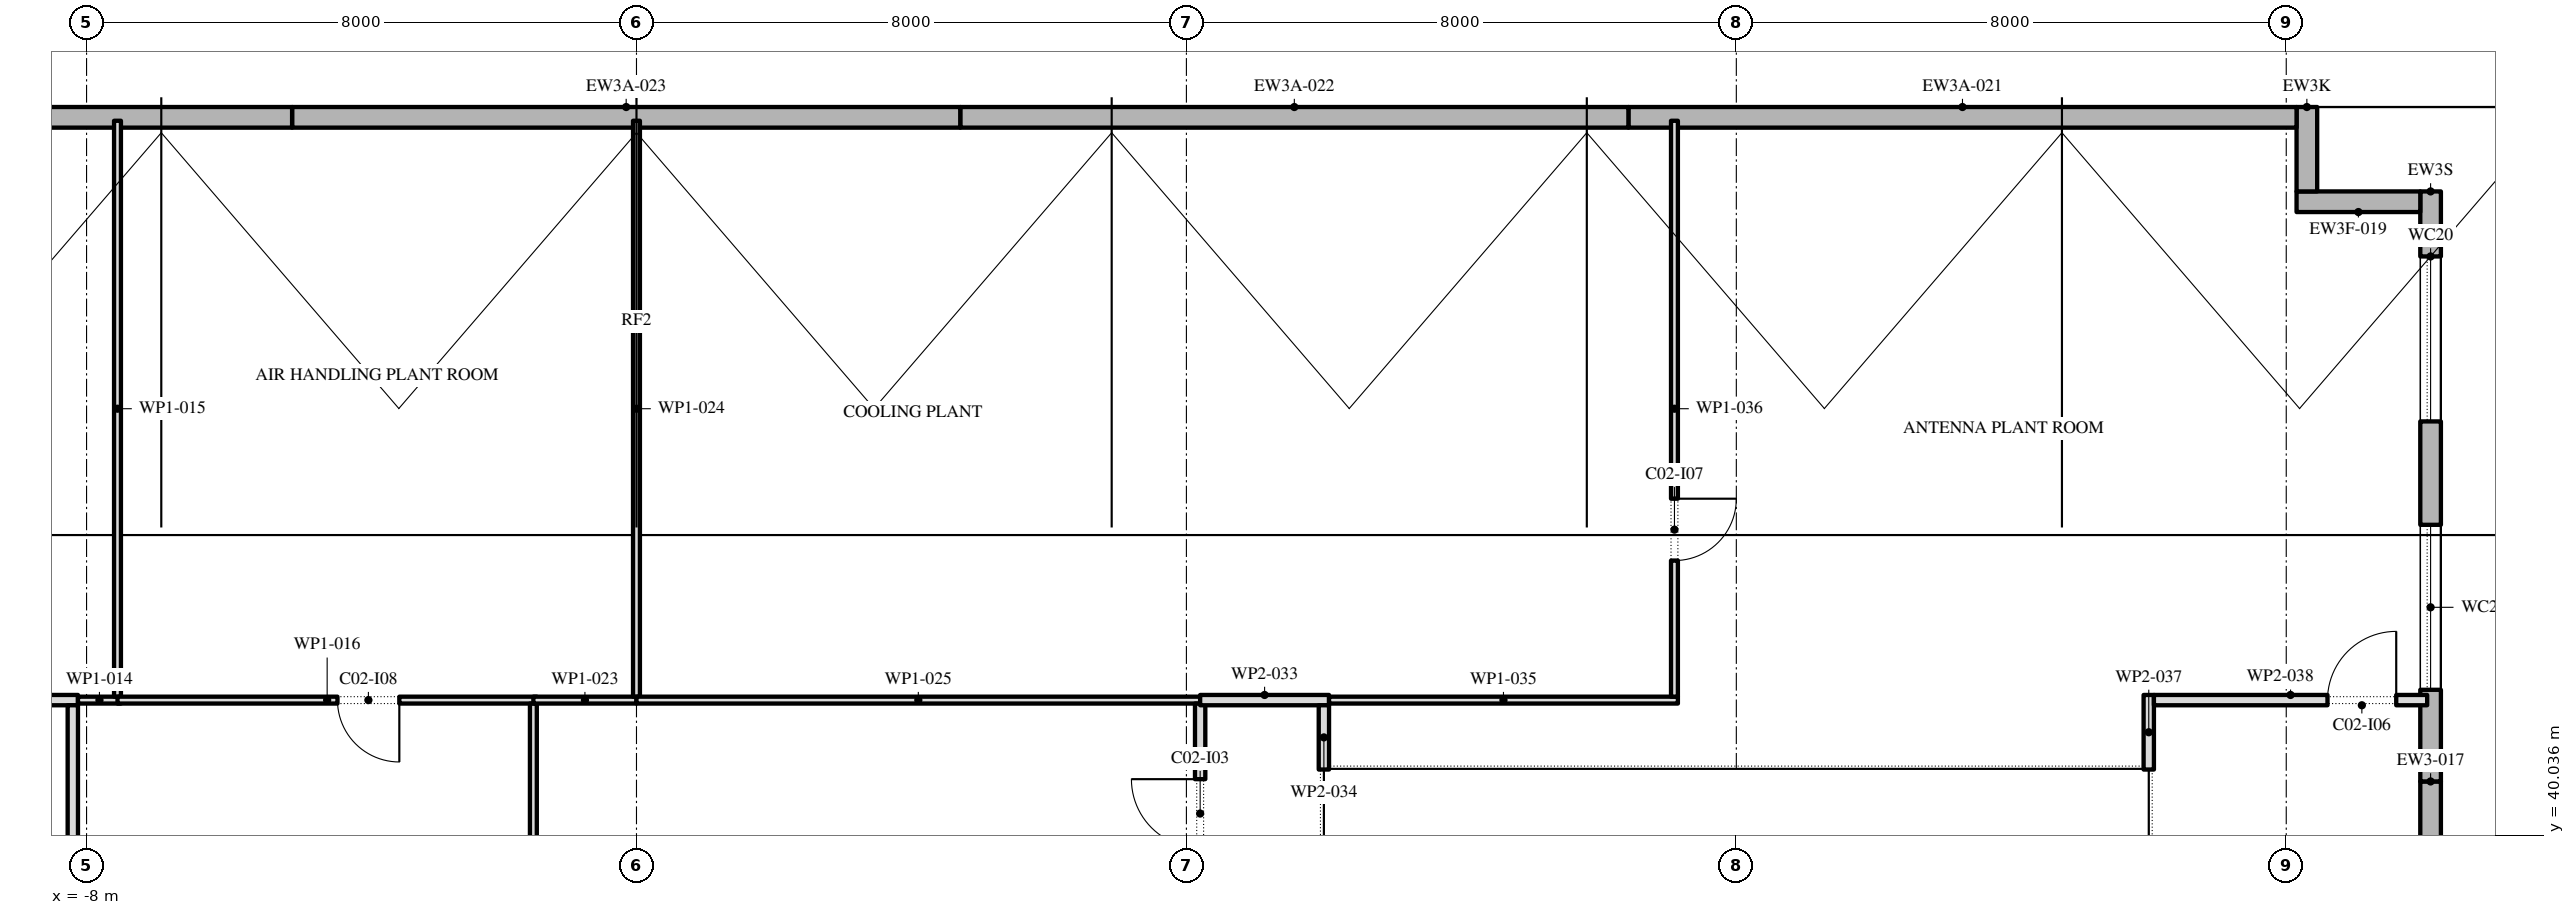
"""IFC4 building model, lengths in metres.
Left out: names, types, materials, properties, quantities, classifications, styles, units other than length and angle.
Written with IfcOpenShell. Run it as: python <this file> out.ifc"""

import sys

from ifc_helpers import new_model, si_unit, direction, frame, frame_2d, origin, place, context, subcontext, project, spatial, polyline, rectangle, outline, extrude, element, fill, save


model = new_model("IFC4")
c1 = context("Model", 3, precision=1e-05, world=origin(), true_north=direction((0.0, 1.0)))
c2 = subcontext(c1, "Body", "Model", "MODEL_VIEW")
j1 = project(units=[si_unit("LENGTHUNIT", "METRE"), si_unit("PLANEANGLEUNIT", "RADIAN")], contexts=[c1])
p1 = place(None, origin())
s1 = spatial("IfcSite", under=j1, at=p1, CompositionType="ELEMENT")
p2 = place(p1, origin())
s2 = spatial("IfcBuilding", under=s1, at=p2, CompositionType="ELEMENT")
p3 = place(p2, frame((0.0, 0.0, 369.0)))
s3 = spatial("IfcBuildingStorey", under=s2, at=p3, CompositionType="ELEMENT", Elevation=369.0)
p4 = place(p3, frame((24.15, 51.05, 0.0), z_axis=(0.0, 0.0, 1.0), x_axis=(-1.0, 0.0, 0.0)))
e1 = element("IfcWall", 1, at=p4, inside=s3, PredefinedType="STANDARD", context=c2, shape_type="SweptSolid", body=[
    extrude(rectangle(XDim=1.8, YDim=0.3, at=frame_2d((0.9, 0.0))), origin(), (0.0, 0.0, 1.0), 6.014),
])
p5 = place(p2, frame((0.0, 0.0, 373.2)))
s4 = spatial("IfcBuildingStorey", under=s2, at=p5, CompositionType="ELEMENT", Elevation=373.2)
p6 = place(p5, frame((26.1, 32.233, 0.0), z_axis=(0.0, 0.0, 1.0), x_axis=(0.0, 1.0, 0.0)))
e2 = element("IfcWall", 2, at=p6, inside=s4, PredefinedType="STANDARD", context=c2, shape_type="SweptSolid", body=[
    extrude(rectangle(XDim=8.583, YDim=0.3, at=frame_2d((4.292, 0.0))), origin(), (0.0, 0.0, 1.0), 4.0),
])
p7 = place(p6, frame((0.946, 0.0, 0.8)))
e3 = element("IfcOpeningElement", 3, at=p7, cuts=e2, PredefinedType="OPENING", context=c2, shape_type="SweptSolid", body=[
    extrude(outline(polyline([(0.0, 0.0), (2.4, 0.0), (2.4, 1.25), (2.377, 1.488), (2.31, 1.717), (2.2, 1.929), (2.051, 2.116), (1.87, 2.272), (1.663, 2.391), (1.437, 2.468), (1.2, 2.5), (0.963, 2.468), (0.737, 2.391), (0.53, 2.272), (0.349, 2.116), (0.2, 1.929), (0.09, 1.717), (0.023, 1.488), (0.0, 1.25), (0.0, 0.0)])), frame((0.0, 0.16, 0.0), z_axis=(0.0, -1.0, 0.0), x_axis=(1.0, 0.0, 0.0)), (0.0, 0.0, 1.0), 0.32),
])
p8 = place(p6, frame((5.238, 0.0, 0.8)))
e4 = element("IfcOpeningElement", 4, at=p8, cuts=e2, PredefinedType="OPENING", context=c2, shape_type="SweptSolid", body=[
    extrude(outline(polyline([(0.0, 0.0), (2.4, 0.0), (2.4, 1.25), (2.377, 1.488), (2.31, 1.717), (2.2, 1.929), (2.051, 2.116), (1.87, 2.272), (1.663, 2.391), (1.437, 2.468), (1.2, 2.5), (0.963, 2.468), (0.737, 2.391), (0.53, 2.272), (0.349, 2.116), (0.2, 1.929), (0.09, 1.717), (0.023, 1.488), (0.0, 1.25), (0.0, 0.0)])), frame((0.0, 0.16, 0.0), z_axis=(0.0, -1.0, 0.0), x_axis=(1.0, 0.0, 0.0)), (0.0, 0.0, 1.0), 0.32),
])
p9 = place(p5, frame((26.1, 40.817, 0.0), z_axis=(0.0, 0.0, 1.0), x_axis=(0.0, 1.0, 0.0)))
e5 = element("IfcWall", 5, at=p9, inside=s4, PredefinedType="STANDARD", context=c2, shape_type="SweptSolid", body=[
    extrude(outline(polyline([(0.0, 0.0), (8.583, 0.0), (8.583, 2.927), (6.992, 4.0), (3.604, 6.285), (3.584, 6.298), (3.584, 4.0), (0.0, 4.0), (0.0, 0.0)])), frame((0.0, 0.15, 0.0), z_axis=(0.0, -1.0, 0.0), x_axis=(1.0, 0.0, 0.0)), (0.0, 0.0, 1.0), 0.3),
])
p10 = place(p9, frame((1.333, 0.0, 0.8)))
e6 = element("IfcOpeningElement", 6, at=p10, cuts=e5, PredefinedType="OPENING", context=c2, shape_type="SweptSolid", body=[
    extrude(outline(polyline([(0.0, 0.0), (2.4, 0.0), (2.4, 0.85), (2.377, 1.088), (2.31, 1.317), (2.2, 1.529), (2.051, 1.717), (1.87, 1.872), (1.663, 1.991), (1.437, 2.068), (1.2, 2.1), (0.963, 2.068), (0.737, 1.991), (0.53, 1.872), (0.349, 1.717), (0.2, 1.529), (0.09, 1.317), (0.023, 1.088), (0.0, 0.85), (0.0, 0.0)])), frame((0.0, 0.16, 0.0), z_axis=(0.0, -1.0, 0.0), x_axis=(1.0, 0.0, 0.0)), (0.0, 0.0, 1.0), 0.32),
])
p11 = place(p9, frame((5.238, 0.0, 0.8)))
e7 = element("IfcOpeningElement", 7, at=p11, cuts=e5, PredefinedType="OPENING", context=c2, shape_type="SweptSolid", body=[
    extrude(outline(polyline([(0.0, 0.0), (2.4, 0.0), (2.4, 1.0), (2.376, 1.221), (2.304, 1.431), (2.188, 1.621), (2.034, 1.781), (1.849, 1.904), (1.641, 1.983), (1.422, 2.016), (1.2, 2.0), (0.978, 2.016), (0.759, 1.983), (0.551, 1.904), (0.366, 1.781), (0.212, 1.621), (0.096, 1.431), (0.024, 1.221), (0.0, 1.0), (0.0, 0.0)])), frame((0.0, 0.16, 0.0), z_axis=(0.0, -1.0, 0.0), x_axis=(1.0, 0.0, 0.0)), (0.0, 0.0, 1.0), 0.32),
])
p12 = place(p5, frame((25.95, 49.25, 0.0), z_axis=(0.0, 0.0, 1.0), x_axis=(-1.0, 0.0, 0.0)))
e8 = element("IfcWall", 8, at=p12, inside=s4, PredefinedType="STANDARD", context=c2, shape_type="SweptSolid", body=[
    extrude(rectangle(XDim=1.8, YDim=0.3, at=frame_2d((0.9, 0.0))), origin(), (0.0, 0.0, 1.0), 3.028),
])
p13 = place(p5, frame((24.3, 49.4, 0.0), z_axis=(0.0, 0.0, 1.0), x_axis=(0.0, 1.0, 0.0)))
e9 = element("IfcWall", 9, at=p13, inside=s4, PredefinedType="STANDARD", context=c2, shape_type="SweptSolid", body=[
    extrude(outline(polyline([(0.0, 0.0), (1.228, 0.0), (1.228, 2.098), (0.0, 2.927), (0.0, 0.0)])), frame((0.0, 0.15, 0.0), z_axis=(0.0, -1.0, 0.0), x_axis=(1.0, 0.0, 0.0)), (0.0, 0.0, 1.0), 0.3),
])
for number, where, z_axis, x_axis in (
    (10, (24.15, 50.478, 0.0), (0.0, 0.0, 1.0), (-1.0, 0.0, 0.0)),
    (11, (14.43, 50.478, 0.0), (0.0, 0.0, 1.0), (-1.0, 0.0, 0.0)),
    (12, (4.71, 50.478, 0.0), (0.0, 0.0, 1.0), (-1.0, 0.0, 0.0)),
    (13, (-5.01, 50.478, 0.0), (0.0, 0.0, 1.0), (-1.0, 0.0, 0.0)),
):
    element("IfcWall", number, at=place(p5, frame(where, z_axis=z_axis, x_axis=x_axis)), inside=s4, PredefinedType="STANDARD", context=c2, shape_type="SweptSolid", body=[
        extrude(rectangle(XDim=9.72, YDim=0.3, at=frame_2d((4.86, 0.0))), origin(), (0.0, 0.0, 1.0), 2.2),
    ])
p14 = place(p5, frame((-9.925, 42.0, 0.0), z_axis=(0.0, 0.0, 1.0), x_axis=(1.0, 0.0, 0.0)))
e14 = element("IfcWall", 14, at=p14, inside=s4, PredefinedType="PARTITIONING", context=c2, shape_type="SweptSolid", body=[
    extrude(rectangle(XDim=1.8, YDim=0.15, at=frame_2d((0.9, 0.0))), origin(), (0.0, 0.0, 1.0), 4.0),
])
p15 = place(p5, frame((-8.2, 41.925, 0.0), z_axis=(0.0, 0.0, 1.0), x_axis=(0.0, -1.0, 0.0)))
e15 = element("IfcWall", 15, at=p15, inside=s4, PredefinedType="PARTITIONING", context=c2, shape_type="SweptSolid", body=[
    extrude(rectangle(XDim=8.975, YDim=0.15, at=frame_2d((4.488, 0.0))), origin(), (0.0, 0.0, 1.0), 4.0),
])
p16 = place(p15, frame((3.025, 0.0, 0.0)))
e16 = element("IfcOpeningElement", 16, at=p16, cuts=e15, PredefinedType="OPENING", context=c2, shape_type="SweptSolid", body=[
    extrude(rectangle(XDim=1.0, YDim=2.1, at=frame_2d((0.5, 1.05))), frame((0.0, 0.085, 0.0), z_axis=(0.0, -1.0, 0.0), x_axis=(1.0, 0.0, 0.0)), (0.0, 0.0, 1.0), 0.17),
])
p17 = place(p5, frame((-8.125, 42.0, 0.0), z_axis=(0.0, 0.0, 1.0), x_axis=(1.0, 0.0, 0.0)))
e17 = element("IfcWall", 17, at=p17, inside=s4, PredefinedType="PARTITIONING", context=c2, shape_type="SweptSolid", body=[
    extrude(rectangle(XDim=0.625, YDim=0.1, at=frame_2d((0.312, 0.0))), origin(), (0.0, 0.0, 1.0), 4.0),
])
p18 = place(p5, frame((-7.55, 42.05, 0.0), z_axis=(0.0, 0.0, 1.0), x_axis=(0.0, 1.0, 0.0)))
e18 = element("IfcWall", 18, at=p18, inside=s4, PredefinedType="PARTITIONING", context=c2, shape_type="SweptSolid", body=[
    extrude(rectangle(XDim=8.378, YDim=0.1, at=frame_2d((4.189, 0.0))), origin(), (0.0, 0.0, 1.0), 4.0),
])
p19 = place(p5, frame((-7.55, 42.0, 0.0), z_axis=(0.0, 0.0, 1.0), x_axis=(1.0, 0.0, 0.0)))
e19 = element("IfcWall", 19, at=p19, inside=s4, PredefinedType="PARTITIONING", context=c2, shape_type="SweptSolid", body=[
    extrude(rectangle(XDim=6.1, YDim=0.1, at=frame_2d((3.05, 0.0))), origin(), (0.0, 0.0, 1.0), 4.0),
])
p20 = place(p19, frame((3.2, 0.0, 0.0)))
e20 = element("IfcOpeningElement", 20, at=p20, cuts=e19, PredefinedType="OPENING", context=c2, shape_type="SweptSolid", body=[
    extrude(rectangle(XDim=0.9, YDim=2.1, at=frame_2d((0.45, 1.05))), frame((0.0, 0.06, 0.0), z_axis=(0.0, -1.0, 0.0), x_axis=(1.0, 0.0, 0.0)), (0.0, 0.0, 1.0), 0.12),
])
p21 = place(p5, frame((-1.5, 41.95, 0.0), z_axis=(0.0, 0.0, 1.0), x_axis=(0.0, -1.0, 0.0)))
e21 = element("IfcWall", 21, at=p21, inside=s4, PredefinedType="PARTITIONING", context=c2, shape_type="SweptSolid", body=[
    extrude(rectangle(XDim=5.5, YDim=0.1, at=frame_2d((2.75, 0.0))), origin(), (0.0, 0.0, 1.0), 4.0),
])
p22 = place(p5, frame((-1.5, 42.0, 0.0), z_axis=(0.0, 0.0, 1.0), x_axis=(1.0, 0.0, 0.0)))
e22 = element("IfcWall", 22, at=p22, inside=s4, PredefinedType="PARTITIONING", context=c2, shape_type="SweptSolid", body=[
    extrude(rectangle(XDim=1.5, YDim=0.1, at=frame_2d((0.75, 0.0))), origin(), (0.0, 0.0, 1.0), 4.0),
])
p23 = place(p5, frame((0.0, 42.05, 0.0), z_axis=(0.0, 0.0, 1.0), x_axis=(0.0, 1.0, 0.0)))
e23 = element("IfcWall", 23, at=p23, inside=s4, PredefinedType="PARTITIONING", context=c2, shape_type="SweptSolid", body=[
    extrude(rectangle(XDim=8.378, YDim=0.1, at=frame_2d((4.189, 0.0))), origin(), (0.0, 0.0, 1.0), 4.0),
])
p24 = place(p5, frame((0.0, 42.0, 0.0), z_axis=(0.0, 0.0, 1.0), x_axis=(1.0, 0.0, 0.0)))
e24 = element("IfcWall", 24, at=p24, inside=s4, PredefinedType="PARTITIONING", context=c2, shape_type="SweptSolid", body=[
    extrude(rectangle(XDim=8.2, YDim=0.1, at=frame_2d((4.1, 0.0))), origin(), (0.0, 0.0, 1.0), 4.0),
])
p25 = place(p5, frame((8.2, 36.5, 0.0), z_axis=(0.0, 0.0, 1.0), x_axis=(0.0, 1.0, 0.0)))
e25 = element("IfcWall", 25, at=p25, inside=s4, PredefinedType="PARTITIONING", context=c2, shape_type="SweptSolid", body=[
    extrude(rectangle(XDim=5.45, YDim=0.15, at=frame_2d((2.725, 0.0))), origin(), (0.0, 0.0, 1.0), 4.0),
])
p26 = place(p25, frame((3.35, 0.0, 0.0)))
e26 = element("IfcOpeningElement", 26, at=p26, cuts=e25, PredefinedType="OPENING", context=c2, shape_type="SweptSolid", body=[
    extrude(rectangle(XDim=1.0, YDim=2.1, at=frame_2d((0.5, 1.05))), frame((0.0, 0.085, 0.0), z_axis=(0.0, -1.0, 0.0), x_axis=(1.0, 0.0, 0.0)), (0.0, 0.0, 1.0), 0.17),
])
p27 = place(p5, frame((8.2, 42.0, 0.0), z_axis=(0.0, 0.0, 1.0), x_axis=(1.0, 0.0, 0.0)))
e27 = element("IfcWall", 27, at=p27, inside=s4, PredefinedType="PARTITIONING", context=c2, shape_type="SweptSolid", body=[
    extrude(rectangle(XDim=1.875, YDim=0.15, at=frame_2d((0.938, 0.0))), origin(), (0.0, 0.0, 1.0), 4.0),
])
p28 = place(p5, frame((10.0, 41.925, 0.0), z_axis=(0.0, 0.0, 1.0), x_axis=(0.0, -1.0, 0.0)))
e28 = element("IfcWall", 28, at=p28, inside=s4, PredefinedType="PARTITIONING", context=c2, shape_type="SweptSolid", body=[
    extrude(rectangle(XDim=0.935, YDim=0.15, at=frame_2d((0.468, 0.0))), origin(), (0.0, 0.0, 1.0), 4.0),
])
p29 = place(p5, frame((10.075, 42.0, 0.0), z_axis=(0.0, 0.0, 1.0), x_axis=(1.0, 0.0, 0.0)))
e29 = element("IfcWall", 29, at=p29, inside=s4, PredefinedType="PARTITIONING", context=c2, shape_type="SweptSolid", body=[
    extrude(rectangle(XDim=5.075, YDim=0.1, at=frame_2d((2.538, 0.0))), origin(), (0.0, 0.0, 1.0), 4.0),
])
p30 = place(p5, frame((15.1, 42.05, 0.0), z_axis=(0.0, 0.0, 1.0), x_axis=(0.0, 1.0, 0.0)))
e30 = element("IfcWall", 30, at=p30, inside=s4, PredefinedType="PARTITIONING", context=c2, shape_type="SweptSolid", body=[
    extrude(rectangle(XDim=8.378, YDim=0.1, at=frame_2d((4.189, 0.0))), origin(), (0.0, 0.0, 1.0), 4.0),
])
p31 = place(p30, frame((1.98, 0.0, 0.0)))
e31 = element("IfcOpeningElement", 31, at=p31, cuts=e30, PredefinedType="OPENING", context=c2, shape_type="SweptSolid", body=[
    extrude(rectangle(XDim=0.9, YDim=2.1, at=frame_2d((0.45, 1.05))), frame((0.0, 0.06, 0.0), z_axis=(0.0, -1.0, 0.0), x_axis=(1.0, 0.0, 0.0)), (0.0, 0.0, 1.0), 0.12),
])
p32 = place(p5, frame((22.0, 40.99, 0.0), z_axis=(0.0, 0.0, 1.0), x_axis=(0.0, 1.0, 0.0)))
e32 = element("IfcWall", 32, at=p32, inside=s4, PredefinedType="PARTITIONING", context=c2, shape_type="SweptSolid", body=[
    extrude(rectangle(XDim=1.085, YDim=0.15, at=frame_2d((0.542, 0.0))), origin(), (0.0, 0.0, 1.0), 4.0),
])
p33 = place(p5, frame((22.075, 42.0, 0.0), z_axis=(0.0, 0.0, 1.0), x_axis=(1.0, 0.0, 0.0)))
e33 = element("IfcWall", 33, at=p33, inside=s4, PredefinedType="PARTITIONING", context=c2, shape_type="SweptSolid", body=[
    extrude(rectangle(XDim=3.975, YDim=0.15, at=frame_2d((1.988, 0.0))), origin(), (0.0, 0.0, 1.0), 4.0),
])
p34 = place(p33, frame((2.525, 0.0, 0.0)))
e34 = element("IfcOpeningElement", 34, at=p34, cuts=e33, PredefinedType="OPENING", context=c2, shape_type="SweptSolid", body=[
    extrude(rectangle(XDim=1.0, YDim=2.1, at=frame_2d((0.5, 1.05))), frame((0.0, 0.085, 0.0), z_axis=(0.0, -1.0, 0.0), x_axis=(1.0, 0.0, 0.0)), (0.0, 0.0, 1.0), 0.17),
])
p35 = place(p10, origin())
e35 = element("IfcWindow", 35, at=p35, inside=s4, PartitioningType="DOUBLE_PANEL_VERTICAL", PredefinedType="WINDOW", context=c2, shape_type="SweptSolid", body=[
    extrude(outline(polyline([(0.0, 0.0), (2.4, 0.0), (2.4, 0.85), (2.377, 1.088), (2.31, 1.317), (2.2, 1.529), (2.051, 1.717), (1.87, 1.872), (1.663, 1.991), (1.437, 2.068), (1.2, 2.1), (0.963, 2.068), (0.737, 1.991), (0.53, 1.872), (0.349, 1.717), (0.2, 1.529), (0.09, 1.317), (0.023, 1.088), (0.0, 0.85), (0.0, 0.0)])), frame((0.0, 0.03, 0.0), z_axis=(0.0, -1.0, 0.0), x_axis=(1.0, 0.0, 0.0)), (0.0, 0.0, 1.0), 0.06),
])
fill(e6, e35)
p36 = place(p11, origin())
e36 = element("IfcWindow", 36, at=p36, inside=s4, PartitioningType="DOUBLE_PANEL_VERTICAL", PredefinedType="WINDOW", context=c2, shape_type="SweptSolid", body=[
    extrude(outline(polyline([(0.0, 0.0), (2.4, 0.0), (2.4, 1.0), (2.376, 1.221), (2.304, 1.431), (2.188, 1.621), (2.034, 1.781), (1.849, 1.904), (1.641, 1.983), (1.422, 2.016), (1.2, 2.0), (0.978, 2.016), (0.759, 1.983), (0.551, 1.904), (0.366, 1.781), (0.212, 1.621), (0.096, 1.431), (0.024, 1.221), (0.0, 1.0), (0.0, 0.0)])), frame((0.0, 0.03, 0.0), z_axis=(0.0, -1.0, 0.0), x_axis=(1.0, 0.0, 0.0)), (0.0, 0.0, 1.0), 0.06),
])
fill(e7, e36)
p37 = place(p26, origin())
e37 = element("IfcDoor", 37, at=p37, inside=s4, OperationType="SINGLE_SWING_LEFT", PredefinedType="DOOR", context=c2, shape_type="SweptSolid", body=[
    extrude(rectangle(XDim=1.0, YDim=2.1, at=frame_2d((0.5, 1.05))), frame((0.0, 0.025, 0.0), z_axis=(0.0, -1.0, 0.0), x_axis=(1.0, 0.0, 0.0)), (0.0, 0.0, 1.0), 0.05),
])
fill(e26, e37)
p38 = place(p34, origin())
e38 = element("IfcDoor", 38, at=p38, inside=s4, OperationType="SINGLE_SWING_LEFT", PredefinedType="DOOR", context=c2, shape_type="SweptSolid", body=[
    extrude(rectangle(XDim=1.0, YDim=2.1, at=frame_2d((0.5, 1.05))), frame((0.0, 0.025, 0.0), z_axis=(0.0, -1.0, 0.0), x_axis=(1.0, 0.0, 0.0)), (0.0, 0.0, 1.0), 0.05),
])
fill(e34, e38)
p39 = place(p31, frame((0.9, 0.0, 0.0), z_axis=(0.0, 0.0, 1.0), x_axis=(-1.0, 0.0, 0.0)))
e39 = element("IfcDoor", 39, at=p39, inside=s4, OperationType="SINGLE_SWING_RIGHT", PredefinedType="DOOR", context=c2, shape_type="SweptSolid", body=[
    extrude(rectangle(XDim=0.9, YDim=2.1, at=frame_2d((0.45, 1.05))), frame((0.0, 0.025, 0.0), z_axis=(0.0, -1.0, 0.0), x_axis=(1.0, 0.0, 0.0)), (0.0, 0.0, 1.0), 0.05),
])
fill(e31, e39)
p40 = place(p20, frame((0.9, 0.0, 0.0), z_axis=(0.0, 0.0, 1.0), x_axis=(-1.0, 0.0, 0.0)))
e40 = element("IfcDoor", 40, at=p40, inside=s4, OperationType="SINGLE_SWING_RIGHT", PredefinedType="DOOR", context=c2, shape_type="SweptSolid", body=[
    extrude(rectangle(XDim=0.9, YDim=2.1, at=frame_2d((0.45, 1.05))), frame((0.0, 0.025, 0.0), z_axis=(0.0, -1.0, 0.0), x_axis=(1.0, 0.0, 0.0)), (0.0, 0.0, 1.0), 0.05),
])
fill(e20, e40)
save(model, sys.argv[1])
